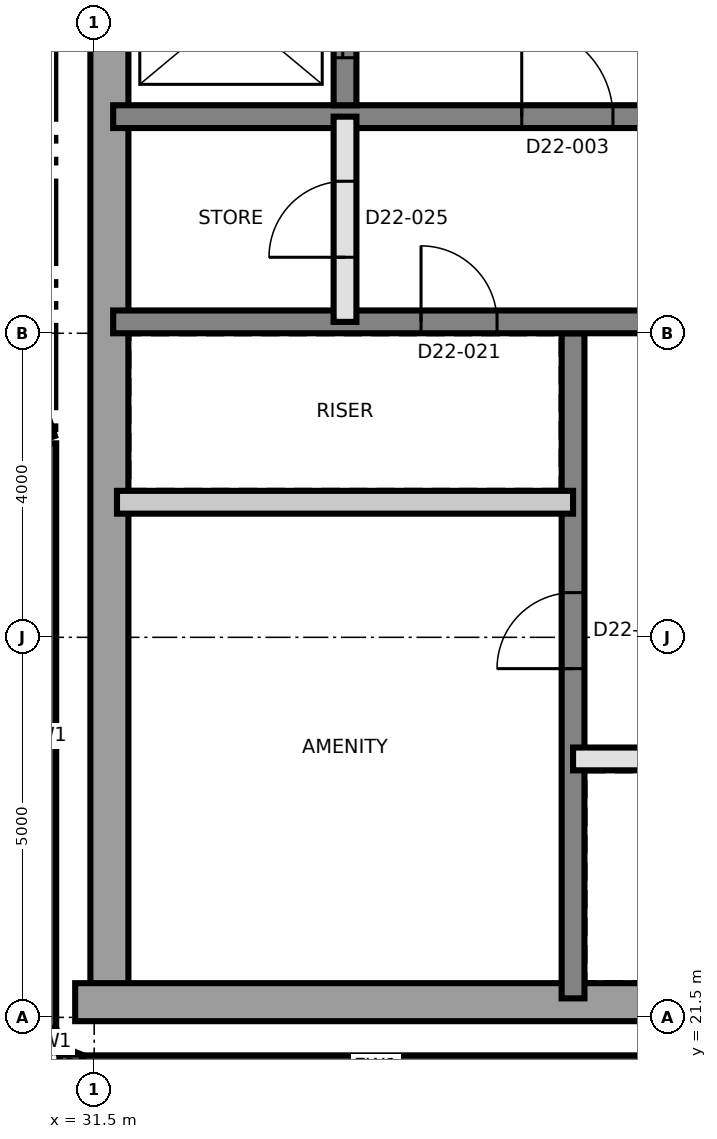
"""IFC4 building model, lengths in metres.
Left out: names, types, materials, properties, quantities, classifications, styles, units other than length and angle.
Written with IfcOpenShell. Run it as: python <this file> out.ifc"""

import sys

from ifc_helpers import new_model, si_unit, direction, frame, frame_2d, origin, place, context, subcontext, project, spatial, rectangle, extrude, element, fill, save


model = new_model("IFC4")
c1 = context("Model", 3, precision=1e-05, world=origin(), true_north=direction((0.0, 1.0)))
c2 = subcontext(c1, "Body", "Model", "MODEL_VIEW")
j1 = project(units=[si_unit("LENGTHUNIT", "METRE"), si_unit("PLANEANGLEUNIT", "RADIAN")], contexts=[c1])
p1 = place(None, origin())
s1 = spatial("IfcSite", under=j1, at=p1, CompositionType="ELEMENT")
p2 = place(p1, origin())
s2 = spatial("IfcBuilding", under=s1, at=p2, CompositionType="ELEMENT")
p3 = place(p2, frame((0.0, 0.0, 203.2)))
s3 = spatial("IfcBuildingStorey", under=s2, at=p3, CompositionType="ELEMENT", Elevation=203.2)
p4 = place(p3, frame((31.7, 21.75, 0.0), z_axis=(0.0, 0.0, 1.0), x_axis=(0.0, 1.0, 0.0)))
e1 = element("IfcWall", 1, at=p4, inside=s3, PredefinedType="SHEAR", context=c2, shape_type="SweptSolid", body=[
    extrude(rectangle(XDim=17.5, YDim=0.5, at=frame_2d((8.75, 0.0))), origin(), (0.0, 0.0, 1.0), 3.7),
])
p5 = place(p3, frame((31.25, 21.7, 0.0), z_axis=(0.0, 0.0, 1.0), x_axis=(1.0, 0.0, 0.0)))
e2 = element("IfcWall", 2, at=p5, inside=s3, PredefinedType="SHEAR", context=c2, shape_type="SweptSolid", body=[
    extrude(rectangle(XDim=27.0, YDim=0.5, at=frame_2d((13.5, 0.0))), origin(), (0.0, 0.0, 1.0), 3.7),
])
p6 = place(p3, frame((37.8, 21.75, 0.0), z_axis=(0.0, 0.0, 1.0), x_axis=(0.0, 1.0, 0.0)))
e3 = element("IfcWall", 3, at=p6, inside=s3, PredefinedType="SHEAR", context=c2, shape_type="SweptSolid", body=[
    extrude(rectangle(XDim=8.75, YDim=0.3, at=frame_2d((4.375, 0.0))), origin(), (0.0, 0.0, 1.0), 3.7),
])
p7 = place(p6, frame((4.338, 0.0, 0.0)))
e4 = element("IfcOpeningElement", 4, at=p7, cuts=e3, PredefinedType="OPENING", context=c2, shape_type="SweptSolid", body=[
    extrude(rectangle(XDim=1.0, YDim=2.1, at=frame_2d((0.5, 1.05))), frame((0.0, 0.16, 0.0), z_axis=(0.0, -1.0, 0.0), x_axis=(1.0, 0.0, 0.0)), (0.0, 0.0, 1.0), 0.32),
])
p8 = place(p3, frame((31.75, 30.65, 0.0), z_axis=(0.0, 0.0, 1.0), x_axis=(1.0, 0.0, 0.0)))
e5 = element("IfcWall", 5, at=p8, inside=s3, PredefinedType="SHEAR", context=c2, shape_type="SweptSolid", body=[
    extrude(rectangle(XDim=26.5, YDim=0.3, at=frame_2d((13.25, 0.0))), origin(), (0.0, 0.0, 1.0), 3.7),
])
p9 = place(p8, frame((24.75, 0.0, 0.0)))
e6 = element("IfcOpeningElement", 6, at=p9, cuts=e5, PredefinedType="OPENING", context=c2, shape_type="SweptSolid", body=[
    extrude(rectangle(XDim=1.0, YDim=2.1, at=frame_2d((0.5, 1.05))), frame((0.0, 0.16, 0.0), z_axis=(0.0, -1.0, 0.0), x_axis=(1.0, 0.0, 0.0)), (0.0, 0.0, 1.0), 0.32),
])
p10 = place(p8, frame((4.05, 0.0, 0.0)))
e7 = element("IfcOpeningElement", 7, at=p10, cuts=e5, PredefinedType="OPENING", context=c2, shape_type="SweptSolid", body=[
    extrude(rectangle(XDim=1.0, YDim=2.1, at=frame_2d((0.5, 1.05))), frame((0.0, 0.16, 0.0), z_axis=(0.0, -1.0, 0.0), x_axis=(1.0, 0.0, 0.0)), (0.0, 0.0, 1.0), 0.32),
])
p11 = place(p3, frame((31.75, 33.35, 0.0), z_axis=(0.0, 0.0, 1.0), x_axis=(1.0, 0.0, 0.0)))
e8 = element("IfcWall", 8, at=p11, inside=s3, PredefinedType="SHEAR", context=c2, shape_type="SweptSolid", body=[
    extrude(rectangle(XDim=26.5, YDim=0.3, at=frame_2d((13.25, 0.0))), origin(), (0.0, 0.0, 1.0), 3.7),
])
p12 = place(p11, frame((13.9, 0.0, 0.0)))
e9 = element("IfcOpeningElement", 9, at=p12, cuts=e8, PredefinedType="OPENING", context=c2, shape_type="SweptSolid", body=[
    extrude(rectangle(XDim=1.4, YDim=2.1, at=frame_2d((0.7, 1.05))), frame((0.0, 0.16, 0.0), z_axis=(0.0, -1.0, 0.0), x_axis=(1.0, 0.0, 0.0)), (0.0, 0.0, 1.0), 0.32),
])
p13 = place(p11, frame((5.375, 0.0, 0.0)))
e10 = element("IfcOpeningElement", 10, at=p13, cuts=e8, PredefinedType="OPENING", context=c2, shape_type="SweptSolid", body=[
    extrude(rectangle(XDim=1.2, YDim=2.1, at=frame_2d((0.6, 1.05))), frame((0.0, 0.16, 0.0), z_axis=(0.0, -1.0, 0.0), x_axis=(1.0, 0.0, 0.0)), (0.0, 0.0, 1.0), 0.32),
])
p14 = place(p11, frame((19.925, 0.0, 0.0)))
e11 = element("IfcOpeningElement", 11, at=p14, cuts=e8, PredefinedType="OPENING", context=c2, shape_type="SweptSolid", body=[
    extrude(rectangle(XDim=1.2, YDim=2.1, at=frame_2d((0.6, 1.05))), frame((0.0, 0.16, 0.0), z_axis=(0.0, -1.0, 0.0), x_axis=(1.0, 0.0, 0.0)), (0.0, 0.0, 1.0), 0.32),
])
p15 = place(p3, frame((34.8, 33.5, 0.0), z_axis=(0.0, 0.0, 1.0), x_axis=(0.0, 1.0, 0.0)))
e12 = element("IfcWall", 12, at=p15, inside=s3, PredefinedType="SHEAR", context=c2, shape_type="SweptSolid", body=[
    extrude(rectangle(XDim=2.55, YDim=0.3, at=frame_2d((1.275, 0.0))), origin(), (0.0, 0.0, 1.0), 3.7),
])
p16 = place(p15, frame((0.625, 0.0, 0.0)))
e13 = element("IfcOpeningElement", 13, at=p16, cuts=e12, PredefinedType="OPENING", context=c2, shape_type="SweptSolid", body=[
    extrude(rectangle(XDim=1.3, YDim=2.4, at=frame_2d((0.65, 1.2))), frame((0.0, 0.16, 0.0), z_axis=(0.0, -1.0, 0.0), x_axis=(1.0, 0.0, 0.0)), (0.0, 0.0, 1.0), 0.32),
])
p17 = place(p3, frame((30.85, 29.052, 0.0), z_axis=(0.0, 0.0, 1.0), x_axis=(0.0, -1.0, 0.0)))
e14 = element("IfcWall", 14, at=p17, inside=s3, PredefinedType="SOLIDWALL", context=c2, shape_type="SweptSolid", body=[
    extrude(rectangle(XDim=7.693, YDim=0.3, at=frame_2d((3.846, 0.0))), origin(), (0.0, 0.0, 1.0), 3.4),
])
for number, where, z_axis, x_axis in (
    (15, (30.861, 21.302, 0.0), (0.0, 0.0, 1.0), (0.383, -0.924, 0.0)),
    (16, (31.048, 20.967, 0.0), (0.0, 0.0, 1.0), (0.924, -0.383, 0.0)),
):
    element("IfcWall", number, at=place(p3, frame(where, z_axis=z_axis, x_axis=x_axis)), inside=s3, PredefinedType="SOLIDWALL", context=c2, shape_type="SweptSolid", body=[
        extrude(rectangle(XDim=0.275, YDim=0.3, at=frame_2d((0.138, 0.0))), origin(), (0.0, 0.0, 1.0), 3.4),
    ])
p18 = place(p3, frame((31.36, 20.85, 0.0), z_axis=(0.0, 0.0, 1.0), x_axis=(1.0, 0.0, 0.0)))
e17 = element("IfcWall", 17, at=p18, inside=s3, PredefinedType="SOLIDWALL", context=c2, shape_type="SweptSolid", body=[
    extrude(rectangle(XDim=7.693, YDim=0.3, at=frame_2d((3.846, 0.0))), origin(), (0.0, 0.0, 1.0), 3.4),
])
p19 = place(p3, frame((30.418, 30.351, 0.0), z_axis=(0.0, 0.0, 1.0), x_axis=(0.32143850255, -0.946930456305, 0.0)))
e18 = element("IfcWall", 18, at=p19, inside=s3, PredefinedType="SOLIDWALL", context=c2, shape_type="SweptSolid", body=[
    extrude(rectangle(XDim=1.32, YDim=0.3, at=frame_2d((0.66, 0.0))), origin(), (0.0, 0.0, 1.0), 3.4),
])
p20 = place(p3, frame((37.8, 24.9, 0.0), z_axis=(0.0, 0.0, 1.0), x_axis=(1.0, 0.0, 0.0)))
e19 = element("IfcWall", 19, at=p20, inside=s3, PredefinedType="SOLIDWALL", context=c2, shape_type="SweptSolid", body=[
    extrude(rectangle(XDim=12.0, YDim=0.3, at=frame_2d((6.0, 0.0))), origin(), (0.0, 0.0, 1.0), 3.4),
])
p21 = place(p20, frame((1.05, 0.0, 0.0)))
e20 = element("IfcOpeningElement", 20, at=p21, cuts=e19, PredefinedType="OPENING", context=c2, shape_type="SweptSolid", body=[
    extrude(rectangle(XDim=0.9, YDim=2.1, at=frame_2d((0.45, 1.05))), frame((0.0, 0.16, 0.0), z_axis=(0.0, -1.0, 0.0), x_axis=(1.0, 0.0, 0.0)), (0.0, 0.0, 1.0), 0.32),
])
p22 = place(p20, frame((10.05, 0.0, 0.0)))
e21 = element("IfcOpeningElement", 21, at=p22, cuts=e19, PredefinedType="OPENING", context=c2, shape_type="SweptSolid", body=[
    extrude(rectangle(XDim=0.9, YDim=2.1, at=frame_2d((0.45, 1.05))), frame((0.0, 0.16, 0.0), z_axis=(0.0, -1.0, 0.0), x_axis=(1.0, 0.0, 0.0)), (0.0, 0.0, 1.0), 0.32),
])
p23 = place(p20, frame((3.95, 0.0, 0.0)))
e22 = element("IfcOpeningElement", 22, at=p23, cuts=e19, PredefinedType="OPENING", context=c2, shape_type="SweptSolid", body=[
    extrude(rectangle(XDim=1.1, YDim=2.4, at=frame_2d((0.55, 1.2))), frame((0.0, 0.16, 0.0), z_axis=(0.0, -1.0, 0.0), x_axis=(1.0, 0.0, 0.0)), (0.0, 0.0, 1.0), 0.32),
])
p24 = place(p20, frame((6.95, 0.0, 0.0)))
e23 = element("IfcOpeningElement", 23, at=p24, cuts=e19, PredefinedType="OPENING", context=c2, shape_type="SweptSolid", body=[
    extrude(rectangle(XDim=1.1, YDim=2.4, at=frame_2d((0.55, 1.2))), frame((0.0, 0.16, 0.0), z_axis=(0.0, -1.0, 0.0), x_axis=(1.0, 0.0, 0.0)), (0.0, 0.0, 1.0), 0.32),
])
p25 = place(p3, frame((31.8, 28.277, 0.0), z_axis=(0.0, 0.0, 1.0), x_axis=(1.0, 0.0, 0.0)))
e24 = element("IfcWall", 24, at=p25, inside=s3, PredefinedType="PARTITIONING", context=c2, shape_type="SweptSolid", body=[
    extrude(rectangle(XDim=6.0, YDim=0.3, at=frame_2d((3.0, 0.0))), origin(), (0.0, 0.0, 1.0), 3.4),
])
p26 = place(p3, frame((34.8, 30.65, 0.0), z_axis=(0.0, 0.0, 1.0), x_axis=(0.0, 1.0, 0.0)))
e25 = element("IfcWall", 25, at=p26, inside=s3, PredefinedType="SOLIDWALL", context=c2, shape_type="SweptSolid", body=[
    extrude(rectangle(XDim=2.7, YDim=0.3, at=frame_2d((1.35, 0.0))), origin(), (0.0, 0.0, 1.0), 3.4),
])
p27 = place(p26, frame((0.85, 0.0, 0.0)))
e26 = element("IfcOpeningElement", 26, at=p27, cuts=e25, PredefinedType="OPENING", context=c2, shape_type="SweptSolid", body=[
    extrude(rectangle(XDim=1.0, YDim=2.1, at=frame_2d((0.5, 1.05))), frame((0.0, 0.16, 0.0), z_axis=(0.0, -1.0, 0.0), x_axis=(1.0, 0.0, 0.0)), (0.0, 0.0, 1.0), 0.32),
])
p28 = place(p13, origin())
e27 = element("IfcDoor", 27, at=p28, inside=s3, OperationType="SINGLE_SWING_LEFT", PredefinedType="DOOR", context=c2, shape_type="SweptSolid", body=[
    extrude(rectangle(XDim=1.2, YDim=2.1, at=frame_2d((0.6, 1.05))), frame((0.0, 0.025, 0.0), z_axis=(0.0, -1.0, 0.0), x_axis=(1.0, 0.0, 0.0)), (0.0, 0.0, 1.0), 0.05),
])
fill(e10, e27)
p29 = place(p16, origin())
e28 = element("IfcDoor", 28, at=p29, inside=s3, OperationType="SLIDING_TO_LEFT", PredefinedType="DOOR", context=c2, shape_type="SweptSolid", body=[
    extrude(rectangle(XDim=1.3, YDim=2.4, at=frame_2d((0.65, 1.2))), frame((0.0, 0.025, 0.0), z_axis=(0.0, -1.0, 0.0), x_axis=(1.0, 0.0, 0.0)), (0.0, 0.0, 1.0), 0.05),
])
fill(e13, e28)
p30 = place(p10, origin())
e29 = element("IfcDoor", 29, at=p30, inside=s3, OperationType="SINGLE_SWING_LEFT", PredefinedType="DOOR", context=c2, shape_type="SweptSolid", body=[
    extrude(rectangle(XDim=1.0, YDim=2.1, at=frame_2d((0.5, 1.05))), frame((0.0, 0.025, 0.0), z_axis=(0.0, -1.0, 0.0), x_axis=(1.0, 0.0, 0.0)), (0.0, 0.0, 1.0), 0.05),
])
fill(e7, e29)
p31 = place(p7, origin())
e30 = element("IfcDoor", 30, at=p31, inside=s3, OperationType="SINGLE_SWING_RIGHT", PredefinedType="DOOR", context=c2, shape_type="SweptSolid", body=[
    extrude(rectangle(XDim=1.0, YDim=2.1, at=frame_2d((0.5, 1.05))), frame((0.0, 0.025, 0.0), z_axis=(0.0, -1.0, 0.0), x_axis=(1.0, 0.0, 0.0)), (0.0, 0.0, 1.0), 0.05),
])
fill(e4, e30)
p32 = place(p27, origin())
e31 = element("IfcDoor", 31, at=p32, inside=s3, OperationType="SINGLE_SWING_LEFT", PredefinedType="DOOR", context=c2, shape_type="SweptSolid", body=[
    extrude(rectangle(XDim=1.0, YDim=2.1, at=frame_2d((0.5, 1.05))), frame((0.0, 0.025, 0.0), z_axis=(0.0, -1.0, 0.0), x_axis=(1.0, 0.0, 0.0)), (0.0, 0.0, 1.0), 0.05),
])
fill(e26, e31)
save(model, sys.argv[1])
